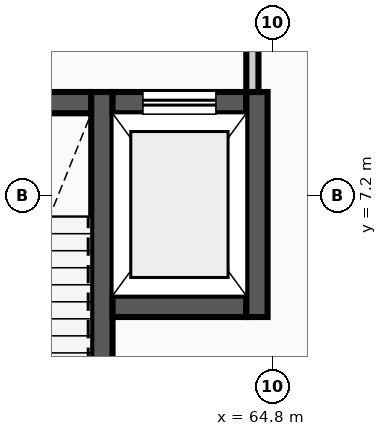
"""IFC4 building model, lengths in metres.
Left out: names, types, materials, properties, quantities, classifications, styles, units other than length and angle.
Written with IfcOpenShell. Run it as: python <this file> out.ifc"""

import sys

from ifc_helpers import new_model, si_unit, direction, frame, frame_2d, origin, place, context, subcontext, project, spatial, rectangle, extrude, element, fill, save


model = new_model("IFC4")
c1 = context("Model", 3, precision=1e-05, world=origin(), true_north=direction((0.0, 1.0)))
c2 = subcontext(c1, "Body", "Model", "MODEL_VIEW")
j1 = project(units=[si_unit("LENGTHUNIT", "METRE"), si_unit("PLANEANGLEUNIT", "RADIAN")], contexts=[c1])
p1 = place(None, origin())
s1 = spatial("IfcSite", under=j1, at=p1, CompositionType="ELEMENT")
p2 = place(p1, origin())
s2 = spatial("IfcBuilding", under=s1, at=p2, CompositionType="ELEMENT")
p3 = place(p2, frame((0.0, 0.0, 9.6)))
s3 = spatial("IfcBuildingStorey", under=s2, at=p3, CompositionType="ELEMENT", Elevation=9.6)
p4 = place(p3, frame((58.67, 8.725, 0.0), z_axis=(0.0, 0.0, 1.0), x_axis=(1.0, 0.0, 0.0)))
e1 = element("IfcWall", 1, at=p4, inside=s3, PredefinedType="SHEAR", context=c2, shape_type="SweptSolid", body=[
    extrude(rectangle(XDim=3.15, YDim=0.35, at=frame_2d((1.575, 0.0))), origin(), (0.0, 0.0, 1.0), 4.2),
])
p5 = place(p4, frame((1.025, 0.0, 0.0)))
e2 = element("IfcOpeningElement", 2, at=p5, cuts=e1, PredefinedType="OPENING", context=c2, shape_type="SweptSolid", body=[
    extrude(rectangle(XDim=1.1, YDim=2.15, at=frame_2d((0.55, 1.075))), frame((0.0, 0.185, 0.0), z_axis=(0.0, -1.0, 0.0), x_axis=(1.0, 0.0, 0.0)), (0.0, 0.0, 1.0), 0.37),
])
p6 = place(p3, frame((61.995, 0.4, 0.0), z_axis=(0.0, 0.0, 1.0), x_axis=(0.0, 1.0, 0.0)))
e3 = element("IfcWall", 3, at=p6, inside=s3, PredefinedType="SHEAR", context=c2, shape_type="SweptSolid", body=[
    extrude(rectangle(XDim=8.5, YDim=0.35, at=frame_2d((4.25, 0.0))), origin(), (0.0, 0.0, 1.0), 4.2),
])
p7 = place(p3, frame((62.17, 5.375, 0.0), z_axis=(0.0, 0.0, 1.0), x_axis=(1.0, 0.0, 0.0)))
e4 = element("IfcWall", 4, at=p7, inside=s3, PredefinedType="SHEAR", context=c2, shape_type="SweptSolid", body=[
    extrude(rectangle(XDim=2.2, YDim=0.35, at=frame_2d((1.1, 0.0))), origin(), (0.0, 0.0, 1.0), 4.2),
])
p8 = place(p3, frame((62.17, 8.725, 0.0), z_axis=(0.0, 0.0, 1.0), x_axis=(1.0, 0.0, 0.0)))
e5 = element("IfcWall", 5, at=p8, inside=s3, PredefinedType="SHEAR", context=c2, shape_type="SweptSolid", body=[
    extrude(rectangle(XDim=2.2, YDim=0.35, at=frame_2d((1.1, 0.0))), origin(), (0.0, 0.0, 1.0), 4.2),
])
p9 = place(p8, frame((0.5, 0.0, 0.0)))
e6 = element("IfcOpeningElement", 6, at=p9, cuts=e5, PredefinedType="OPENING", context=c2, shape_type="SweptSolid", body=[
    extrude(rectangle(XDim=1.2, YDim=2.2, at=frame_2d((0.6, 1.1))), frame((0.0, 0.185, 0.0), z_axis=(0.0, -1.0, 0.0), x_axis=(1.0, 0.0, 0.0)), (0.0, 0.0, 1.0), 0.37),
])
p10 = place(p3, frame((64.545, 5.2, 0.0), z_axis=(0.0, 0.0, 1.0), x_axis=(0.0, 1.0, 0.0)))
e7 = element("IfcWall", 7, at=p10, inside=s3, PredefinedType="SHEAR", context=c2, shape_type="SweptSolid", body=[
    extrude(rectangle(XDim=3.7, YDim=0.35, at=frame_2d((1.85, 0.0))), origin(), (0.0, 0.0, 1.0), 4.2),
])
p11 = place(p3, frame((64.47, 8.9, 0.0), z_axis=(0.0, 0.0, 1.0), x_axis=(0.0, 1.0, 0.0)))
e8 = element("IfcWall", 8, at=p11, inside=s3, PredefinedType="PARTITIONING", context=c2, shape_type="SweptSolid", body=[
    extrude(rectangle(XDim=2.45, YDim=0.2, at=frame_2d((1.225, 0.0))), origin(), (0.0, 0.0, 1.0), 4.2),
])
p12 = place(p9, origin())
e9 = element("IfcDoor", 9, at=p12, inside=s3, OperationType="SLIDING_TO_RIGHT", PredefinedType="DOOR", context=c2, shape_type="SweptSolid", body=[
    extrude(rectangle(XDim=1.2, YDim=2.2, at=frame_2d((0.6, 1.1))), frame((0.0, 0.025, 0.0), z_axis=(0.0, -1.0, 0.0), x_axis=(1.0, 0.0, 0.0)), (0.0, 0.0, 1.0), 0.05),
])
fill(e6, e9)
save(model, sys.argv[1])
